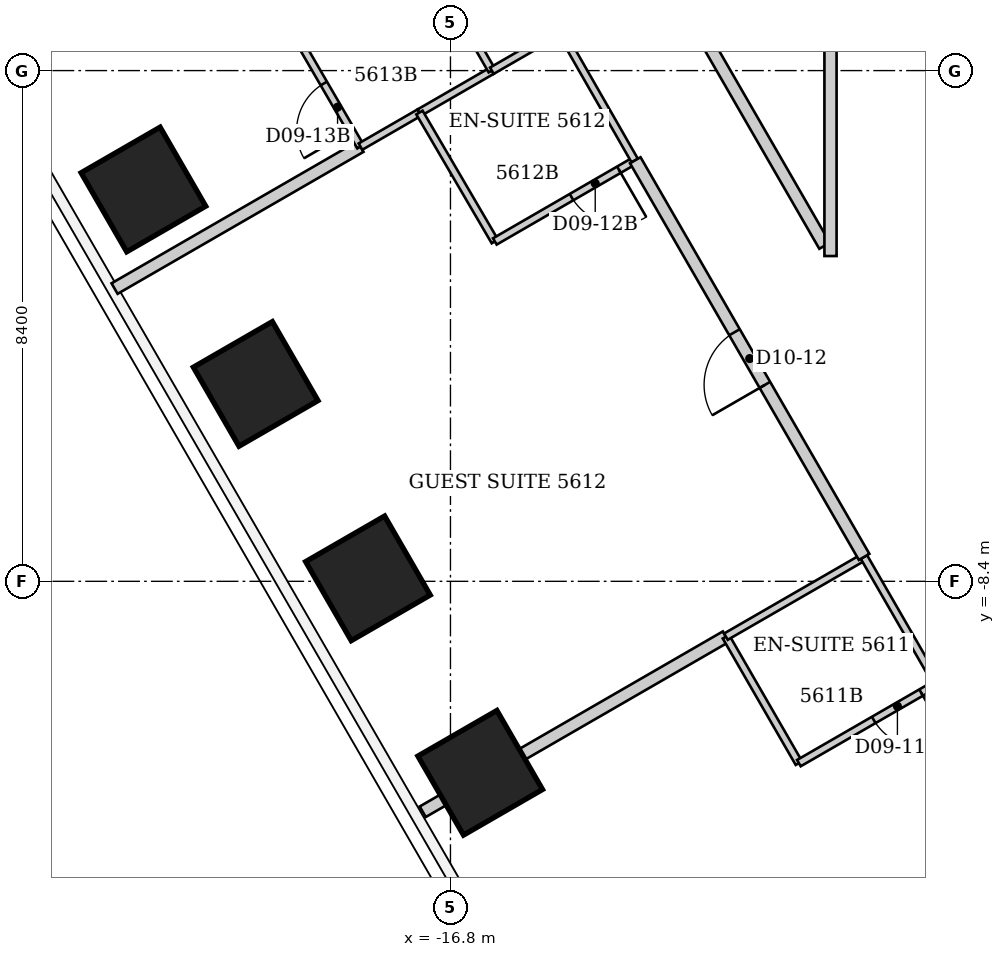
"""IFC4 building model, lengths in metres.
Left out: names, types, materials, properties, quantities, classifications, styles, units other than length and angle.
Written with IfcOpenShell. Run it as: python <this file> out.ifc"""

import sys

from ifc_helpers import new_model, si_unit, direction, frame, frame_2d, origin, origin_2d, place, context, subcontext, project, spatial, rectangle, extrude, element, fill, save


model = new_model("IFC4")
c1 = context("Model", 3, precision=1e-05, world=origin(), true_north=direction((0.0, 1.0)))
c2 = subcontext(c1, "Body", "Model", "MODEL_VIEW")
j1 = project(units=[si_unit("LENGTHUNIT", "METRE"), si_unit("PLANEANGLEUNIT", "RADIAN")], contexts=[c1])
p1 = place(None, origin())
s1 = spatial("IfcSite", under=j1, at=p1, CompositionType="ELEMENT")
p2 = place(p1, origin())
s2 = spatial("IfcBuilding", under=s1, at=p2, CompositionType="ELEMENT")
p3 = place(p2, frame((0.0, 0.0, 225.0)))
s3 = spatial("IfcBuildingStorey", under=s2, at=p3, CompositionType="ELEMENT", Elevation=225.0)
for number, where, z_axis, x_axis in (
    (1, (-16.311, -11.549, 0.0), (0.0, 0.0, 1.0), (-0.866, -0.5, 0.0)),
    (2, (-18.157, -8.351, 0.0), (0.0, 0.0, 1.0), (-0.866, -0.5, 0.0)),
    (3, (-20.003, -5.153, 0.0), (0.0, 0.0, 1.0), (-0.866, -0.5, 0.0)),
    (4, (-21.85, -1.956, 0.0), (0.0, 0.0, 1.0), (-0.866, -0.5, 0.0)),
    (5, (-23.696, 1.242, 0.0), (0.0, 0.0, 1.0), (-0.866, -0.5, 0.0)),
):
    element("IfcColumn", number, at=place(p3, frame(where, z_axis=z_axis, x_axis=x_axis)), inside=s3, PredefinedType="COLUMN", context=c2, shape_type="SweptSolid", body=[
        extrude(rectangle(XDim=1.5, YDim=1.5, at=origin_2d()), origin(), (0.0, 0.0, 1.0), 3.8),
    ])
p4 = place(p3, frame((-22.324, -3.585, 0.0), z_axis=(0.0, 0.0, 1.0), x_axis=(0.86600796803, 0.500030198396, 0.0)))
e6 = element("IfcWall", 6, at=p4, inside=s3, PredefinedType="PARTITIONING", context=c2, shape_type="SweptSolid", body=[
    extrude(rectangle(XDim=4.67, YDim=0.2, at=frame_2d((2.335, 0.0))), origin(), (0.0, 0.0, 1.0), 3.64),
])
p5 = place(p3, frame((-19.61, 1.04, 0.0), z_axis=(0.0, 0.0, 1.0), x_axis=(0.502242265546, -0.864726954997, 0.0)))
e7 = element("IfcWall", 7, at=p5, inside=s3, PredefinedType="PARTITIONING", context=c2, shape_type="SweptSolid", body=[
    extrude(rectangle(XDim=2.648, YDim=0.12, at=frame_2d((1.324, 0.0))), origin(), (0.0, 0.0, 1.0), 3.64),
])
p6 = place(p5, frame((1.448, 0.0, 0.0)))
e8 = element("IfcOpeningElement", 8, at=p6, cuts=e7, PredefinedType="OPENING", context=c2, shape_type="SweptSolid", body=[
    extrude(rectangle(XDim=0.9, YDim=2.03, at=frame_2d((0.45, 1.015))), frame((0.0, 0.06, 0.0), z_axis=(0.0, -1.0, 0.0), x_axis=(1.0, 0.0, 0.0)), (0.0, 0.0, 1.0), 0.12),
])
p7 = place(p3, frame((-18.28, -1.25, 0.0), z_axis=(0.0, 0.0, 1.0), x_axis=(0.866007717299, 0.500030632641, 0.0)))
e9 = element("IfcWall", 9, at=p7, inside=s3, PredefinedType="PARTITIONING", context=c2, shape_type="SweptSolid", body=[
    extrude(rectangle(XDim=1.12, YDim=0.12, at=frame_2d((0.56, 0.0))), origin(), (0.0, 0.0, 1.0), 3.64),
])
p8 = place(p3, frame((-17.31, -0.69, 0.0), z_axis=(0.0, 0.0, 1.0), x_axis=(0.865940235891, 0.500147486112, 0.0)))
e10 = element("IfcWall", 10, at=p8, inside=s3, PredefinedType="PARTITIONING", context=c2, shape_type="SweptSolid", body=[
    extrude(rectangle(XDim=1.375, YDim=0.12, at=frame_2d((0.688, 0.0))), origin(), (0.0, 0.0, 1.0), 3.64),
])
p9 = place(p3, frame((-17.31, -0.69, 0.0), z_axis=(0.0, 0.0, 1.0), x_axis=(0.50485955871, -0.863201497901, 0.0)))
e11 = element("IfcWall", 11, at=p9, inside=s3, PredefinedType="PARTITIONING", context=c2, shape_type="SweptSolid", body=[
    extrude(rectangle(XDim=2.456, YDim=0.12, at=frame_2d((1.228, 0.0))), origin(), (0.0, 0.0, 1.0), 3.64),
])
p10 = place(p3, frame((-17.256, -12.19, 0.0), z_axis=(0.0, 0.0, 1.0), x_axis=(0.865937714159, 0.500151852138, 0.0)))
e12 = element("IfcWall", 12, at=p10, inside=s3, PredefinedType="PARTITIONING", context=c2, shape_type="SweptSolid", body=[
    extrude(rectangle(XDim=5.758, YDim=0.2, at=frame_2d((2.879, 0.0))), origin(), (0.0, 0.0, 1.0), 3.038),
])
p11 = place(p3, frame((-16.12, 0.0, 0.0), z_axis=(0.0, 0.0, 1.0), x_axis=(-0.499338582192, 0.866406936915, 0.0)))
e13 = element("IfcWall", 13, at=p11, inside=s3, PredefinedType="PARTITIONING", context=c2, shape_type="SweptSolid", body=[
    extrude(rectangle(XDim=2.643, YDim=0.12, at=frame_2d((1.322, 0.0))), origin(), (0.0, 0.0, 1.0), 3.64),
])
p12 = place(p3, frame((-16.119, -0.002, 0.0), z_axis=(0.0, 0.0, 1.0), x_axis=(0.865998449813, 0.500046682742, 0.0)))
e14 = element("IfcWall", 14, at=p12, inside=s3, PredefinedType="PARTITIONING", context=c2, shape_type="SweptSolid", body=[
    extrude(rectangle(XDim=1.304, YDim=0.12, at=frame_2d((0.652, 0.0))), origin(), (0.0, 0.0, 1.0), 3.64),
])
p13 = place(p3, frame((-16.07, -2.81, 0.0), z_axis=(0.0, 0.0, 1.0), x_axis=(0.865675724273, 0.500605174168, 0.0)))
e15 = element("IfcWall", 15, at=p13, inside=s3, PredefinedType="PARTITIONING", context=c2, shape_type="SweptSolid", body=[
    extrude(rectangle(XDim=2.657, YDim=0.12, at=frame_2d((1.329, 0.0))), origin(), (0.0, 0.0, 1.0), 3.023),
])
p14 = place(p13, frame((1.457, 0.0, 0.0)))
e16 = element("IfcOpeningElement", 16, at=p14, cuts=e15, PredefinedType="OPENING", context=c2, shape_type="SweptSolid", body=[
    extrude(rectangle(XDim=0.9, YDim=2.03, at=frame_2d((0.45, 1.015))), frame((0.0, 0.06, 0.0), z_axis=(0.0, -1.0, 0.0), x_axis=(1.0, 0.0, 0.0)), (0.0, 0.0, 1.0), 0.12),
])
p15 = place(p3, frame((-14.99, 0.65, 0.0), z_axis=(0.0, 0.0, 1.0), x_axis=(0.497027744361, -0.86773464915, 0.0)))
e17 = element("IfcWall", 17, at=p15, inside=s3, PredefinedType="PARTITIONING", context=c2, shape_type="SweptSolid", body=[
    extrude(rectangle(XDim=2.455, YDim=0.12, at=frame_2d((1.227, 0.0))), origin(), (0.0, 0.0, 1.0), 3.64),
])
p16 = place(p3, frame((-12.27, -9.31, 0.0), z_axis=(0.0, 0.0, 1.0), x_axis=(0.499737123639, -0.866177122335, 0.0)))
e18 = element("IfcWall", 18, at=p16, inside=s3, PredefinedType="PARTITIONING", context=c2, shape_type="SweptSolid", body=[
    extrude(rectangle(XDim=2.401, YDim=0.12, at=frame_2d((1.201, 0.0))), origin(), (0.0, 0.0, 1.0), 3.64),
])
p17 = place(p3, frame((-12.27, -9.31, 0.0), z_axis=(0.0, 0.0, 1.0), x_axis=(0.866114241029, 0.499846097802, 0.0)))
e19 = element("IfcWall", 19, at=p17, inside=s3, PredefinedType="PARTITIONING", context=c2, shape_type="SweptSolid", body=[
    extrude(rectangle(XDim=2.621, YDim=0.12, at=frame_2d((1.311, 0.0))), origin(), (0.0, 0.0, 1.0), 3.038),
])
p18 = place(p3, frame((-11.07, -11.39, 0.0), z_axis=(0.0, 0.0, 1.0), x_axis=(0.866154567199, 0.49977621564, 0.0)))
e20 = element("IfcWall", 20, at=p18, inside=s3, PredefinedType="PARTITIONING", context=c2, shape_type="SweptSolid", body=[
    extrude(rectangle(XDim=2.621, YDim=0.12, at=frame_2d((1.311, 0.0))), origin(), (0.0, 0.0, 1.0), 3.64),
])
p19 = place(p18, frame((1.421, 0.0, 0.0)))
e21 = element("IfcOpeningElement", 21, at=p19, cuts=e20, PredefinedType="OPENING", context=c2, shape_type="SweptSolid", body=[
    extrude(rectangle(XDim=0.9, YDim=2.03, at=frame_2d((0.45, 1.015))), frame((0.0, 0.06, 0.0), z_axis=(0.0, -1.0, 0.0), x_axis=(1.0, 0.0, 0.0)), (0.0, 0.0, 1.0), 0.12),
])
p20 = place(p3, frame((-10.647, -2.881, 0.0), z_axis=(0.0, 0.0, 1.0), x_axis=(-0.499665221769, 0.866218601829, 0.0)))
e22 = element("IfcWall", 22, at=p20, inside=s3, PredefinedType="PARTITIONING", context=c2, shape_type="SweptSolid", body=[
    extrude(rectangle(XDim=8.371, YDim=0.2, at=frame_2d((4.186, 0.0))), origin(), (0.0, 0.0, 1.0), 3.64),
])
p21 = place(p3, frame((-10.55, 8.9, 0.0), z_axis=(0.0, 0.0, 1.0), x_axis=(0.0, -1.0, 0.0)))
e23 = element("IfcWall", 23, at=p21, inside=s3, PredefinedType="PARTITIONING", context=c2, shape_type="SweptSolid", body=[
    extrude(rectangle(XDim=11.95, YDim=0.2, at=frame_2d((5.975, 0.0))), origin(), (0.0, 0.0, 1.0), 3.64),
])
p22 = place(p21, frame((5.425, 0.0, 0.0)))
e24 = element("IfcOpeningElement", 24, at=p22, cuts=e23, PredefinedType="OPENING", context=c2, shape_type="SweptSolid", body=[
    extrude(rectangle(XDim=1.1, YDim=2.2, at=frame_2d((0.55, 1.1))), frame((0.0, 0.1, 0.0), z_axis=(0.0, -1.0, 0.0), x_axis=(1.0, 0.0, 0.0)), (0.0, 0.0, 1.0), 0.2),
])
p23 = place(p3, frame((-10.0, -8.0, 0.0), z_axis=(0.0, 0.0, 1.0), x_axis=(0.499693115345, -0.866202511239, 0.0)))
e25 = element("IfcWall", 25, at=p23, inside=s3, PredefinedType="PARTITIONING", context=c2, shape_type="SweptSolid", body=[
    extrude(rectangle(XDim=2.401, YDim=0.12, at=frame_2d((1.201, 0.0))), origin(), (0.0, 0.0, 1.0), 3.64),
])
p24 = place(p3, frame((-9.997, -7.998, 0.0), z_axis=(0.0, 0.0, 1.0), x_axis=(-0.499699067435, 0.866199077582, 0.0)))
e26 = element("IfcWall", 26, at=p24, inside=s3, PredefinedType="PARTITIONING", context=c2, shape_type="SweptSolid", body=[
    extrude(rectangle(XDim=7.531, YDim=0.2, at=frame_2d((3.766, 0.0))), origin(), (0.0, 0.0, 1.0), 3.64),
])
p25 = place(p24, frame((3.266, 0.0, 0.0)))
e27 = element("IfcOpeningElement", 27, at=p25, cuts=e26, PredefinedType="OPENING", context=c2, shape_type="SweptSolid", body=[
    extrude(rectangle(XDim=1.0, YDim=2.13, at=frame_2d((0.5, 1.065))), frame((0.0, 0.1, 0.0), z_axis=(0.0, -1.0, 0.0), x_axis=(1.0, 0.0, 0.0)), (0.0, 0.0, 1.0), 0.2),
])
p26 = place(p19, origin())
e28 = element("IfcDoor", 28, at=p26, inside=s3, OperationType="SINGLE_SWING_RIGHT", PredefinedType="DOOR", context=c2, shape_type="SweptSolid", body=[
    extrude(rectangle(XDim=0.9, YDim=2.03, at=frame_2d((0.45, 1.015))), frame((0.0, 0.025, 0.0), z_axis=(0.0, -1.0, 0.0), x_axis=(1.0, 0.0, 0.0)), (0.0, 0.0, 1.0), 0.05),
])
fill(e21, e28)
p27 = place(p25, origin())
e29 = element("IfcDoor", 29, at=p27, inside=s3, OperationType="SINGLE_SWING_LEFT", PredefinedType="DOOR", context=c2, shape_type="SweptSolid", body=[
    extrude(rectangle(XDim=1.0, YDim=2.13, at=frame_2d((0.5, 1.065))), frame((0.0, 0.025, 0.0), z_axis=(0.0, -1.0, 0.0), x_axis=(1.0, 0.0, 0.0)), (0.0, 0.0, 1.0), 0.05),
])
fill(e27, e29)
p28 = place(p14, origin())
e30 = element("IfcDoor", 30, at=p28, inside=s3, OperationType="SINGLE_SWING_RIGHT", PredefinedType="DOOR", context=c2, shape_type="SweptSolid", body=[
    extrude(rectangle(XDim=0.9, YDim=2.03, at=frame_2d((0.45, 1.015))), frame((0.0, 0.025, 0.0), z_axis=(0.0, -1.0, 0.0), x_axis=(1.0, 0.0, 0.0)), (0.0, 0.0, 1.0), 0.05),
])
fill(e16, e30)
p29 = place(p6, origin())
e31 = element("IfcDoor", 31, at=p29, inside=s3, OperationType="SINGLE_SWING_RIGHT", PredefinedType="DOOR", context=c2, shape_type="SweptSolid", body=[
    extrude(rectangle(XDim=0.9, YDim=2.03, at=frame_2d((0.45, 1.015))), frame((0.0, 0.025, 0.0), z_axis=(0.0, -1.0, 0.0), x_axis=(1.0, 0.0, 0.0)), (0.0, 0.0, 1.0), 0.05),
])
fill(e8, e31)
save(model, sys.argv[1])
